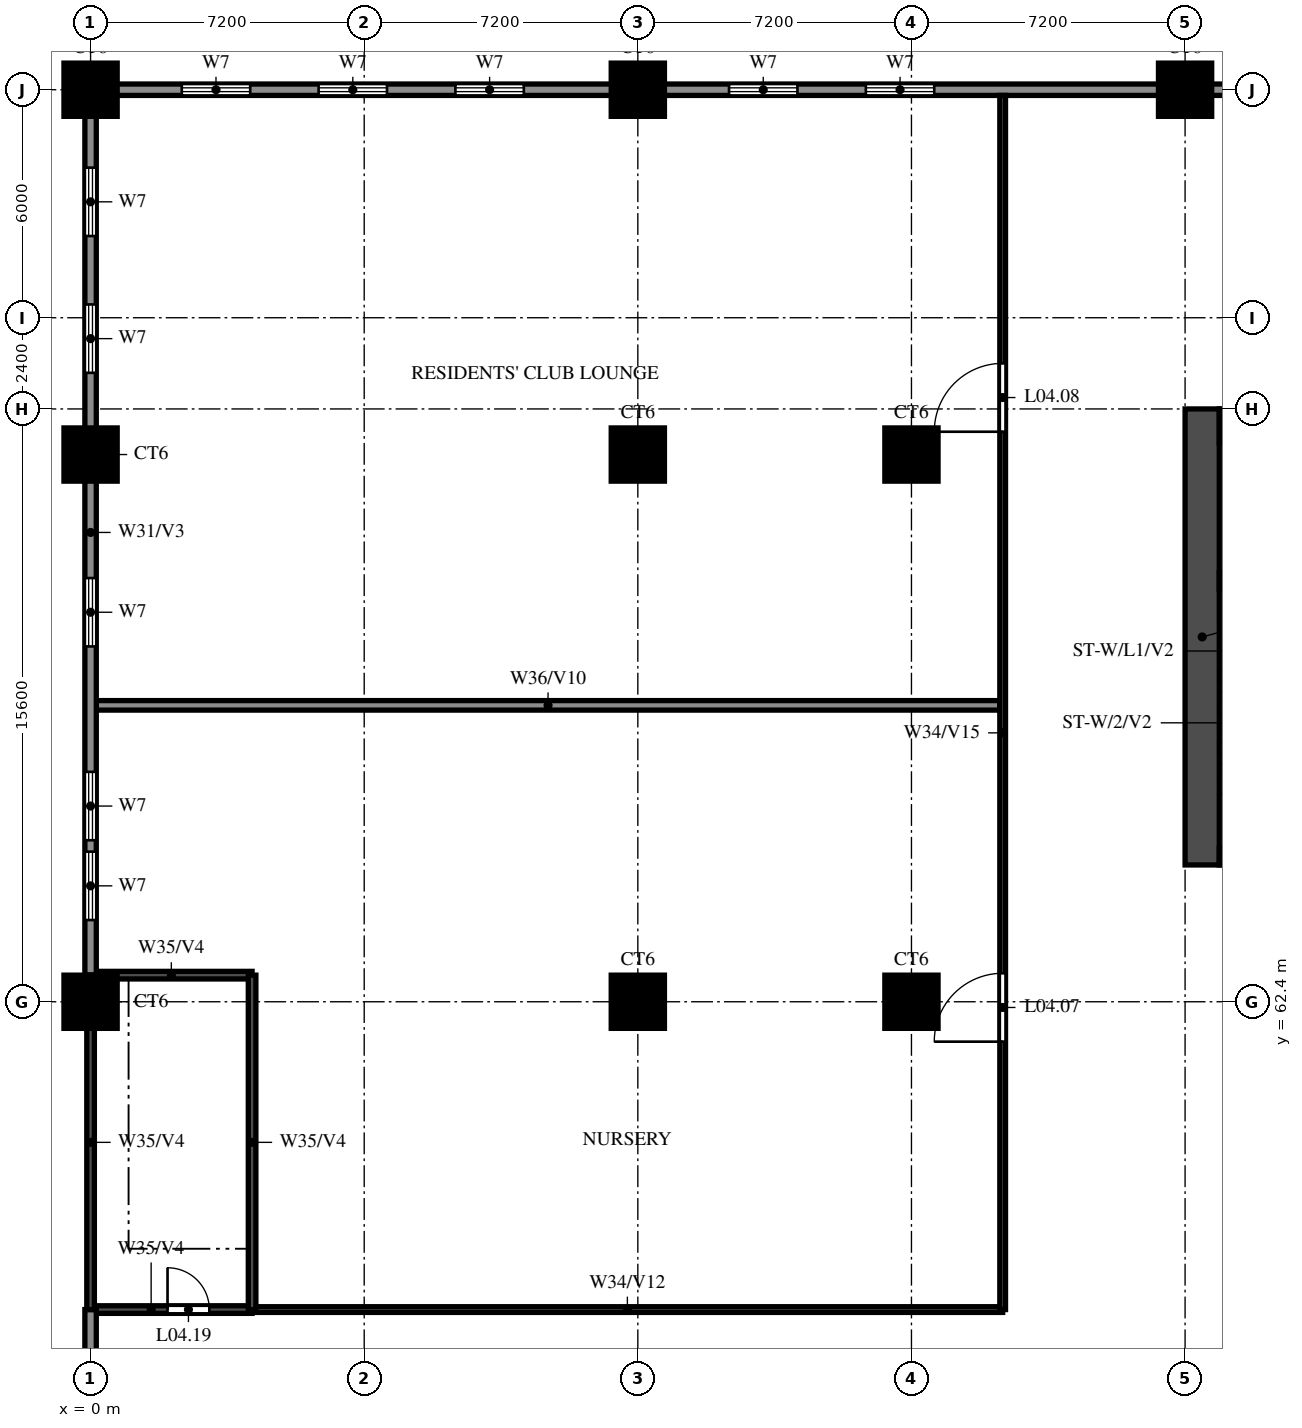
"""IFC4 building model, lengths in metres.
Left out: names, types, materials, properties, quantities, classifications, styles, units other than length and angle.
Written with IfcOpenShell. Run it as: python <this file> out.ifc"""

import sys

from ifc_helpers import new_model, si_unit, direction, frame, frame_2d, origin, origin_2d, place, context, subcontext, project, spatial, rectangle, circle, extrude, source, transform, mapped, element, fill, save


model = new_model("IFC4")
c1 = context("Model", 3, precision=1e-05, world=origin(), true_north=direction((0.0, 1.0)))
c2 = subcontext(c1, "Body", "Model", "MODEL_VIEW")
j1 = project(units=[si_unit("LENGTHUNIT", "METRE"), si_unit("PLANEANGLEUNIT", "RADIAN")], contexts=[c1])
p1 = place(None, origin())
s1 = spatial("IfcSite", under=j1, at=p1, CompositionType="ELEMENT")
p2 = place(p1, origin())
s2 = spatial("IfcBuilding", under=s1, at=p2, CompositionType="ELEMENT")
p3 = place(p2, frame((0.0, 0.0, 21.6)))
s3 = spatial("IfcBuildingStorey", under=s2, at=p3, CompositionType="ELEMENT", Elevation=21.6)
m1 = source(origin(), c2, "Body", "SweptSolid", [
    extrude(circle(Radius=0.7, at=origin_2d()), origin(), (0.0, 0.0, 1.0), 4.95),
])
for number, where, z_axis, x_axis in (
    (1, (0.0, 62.4, 0.0), (0.0, 0.0, 1.0), (1.0, 0.0, 0.0)),
    (2, (14.4, 62.4, 0.0), (0.0, 0.0, 1.0), (1.0, 0.0, 0.0)),
    (3, (21.6, 62.4, 0.0), (0.0, 0.0, 1.0), (1.0, 0.0, 0.0)),
    (4, (0.0, 76.8, 0.0), (0.0, 0.0, 1.0), (1.0, 0.0, 0.0)),
    (5, (14.4, 76.8, 0.0), (0.0, 0.0, 1.0), (1.0, 0.0, 0.0)),
    (6, (21.6, 76.8, 0.0), (0.0, 0.0, 1.0), (1.0, 0.0, 0.0)),
    (7, (0.0, 86.4, 0.0), (0.0, 0.0, 1.0), (1.0, 0.0, 0.0)),
    (8, (14.4, 86.4, 0.0), (0.0, 0.0, 1.0), (1.0, 0.0, 0.0)),
    (9, (28.8, 86.4, 0.0), (0.0, 0.0, 1.0), (1.0, 0.0, 0.0)),
):
    element("IfcColumn", number, at=place(p3, frame(where, z_axis=z_axis, x_axis=x_axis)), inside=s3, PredefinedType="COLUMN", context=c2, shape_type="MappedRepresentation", body=[
        mapped(m1, transform((0.0, 0.0, 0.0))),
    ])
p4 = place(p3, frame((29.25, 66.0, 0.0), z_axis=(0.0, 0.0, 1.0), x_axis=(0.0, 1.0, 0.0)))
e10 = element("IfcWall", 10, at=p4, inside=s3, PredefinedType="SHEAR", context=c2, shape_type="SweptSolid", body=[
    extrude(rectangle(XDim=12.0, YDim=0.9, at=frame_2d((6.0, 0.0))), origin(), (0.0, 0.0, 1.0), 4.95),
])
p5 = place(p3, frame((29.7, 77.55, 0.0), z_axis=(0.0, 0.0, 1.0), x_axis=(1.0, 0.0, 0.0)))
e11 = element("IfcWall", 11, at=p5, inside=s3, PredefinedType="SHEAR", context=c2, shape_type="SweptSolid", body=[
    extrude(rectangle(XDim=41.4, YDim=0.9, at=frame_2d((20.7, 0.0))), origin(), (0.0, 0.0, 1.0), 4.95),
])
p6 = place(p3, frame((29.7, 66.225, 0.0), z_axis=(0.0, 0.0, 1.0), x_axis=(1.0, 0.0, 0.0)))
e12 = element("IfcWall", 12, at=p6, inside=s3, PredefinedType="SHEAR", context=c2, shape_type="SweptSolid", body=[
    extrude(rectangle(XDim=41.4, YDim=0.45, at=frame_2d((20.7, 0.0))), origin(), (0.0, 0.0, 1.0), 4.95),
])
p7 = place(p6, frame((0.925, 0.0, 0.0)))
e13 = element("IfcOpeningElement", 13, at=p7, cuts=e12, PredefinedType="OPENING", context=c2, shape_type="SweptSolid", body=[
    extrude(rectangle(XDim=1.1, YDim=2.1, at=frame_2d((0.55, 1.05))), frame((0.0, 0.235, 0.0), z_axis=(0.0, -1.0, 0.0), x_axis=(1.0, 0.0, 0.0)), (0.0, 0.0, 1.0), 0.47),
])
p8 = place(p6, frame((3.738, 0.0, 0.0)))
e14 = element("IfcOpeningElement", 14, at=p8, cuts=e12, PredefinedType="OPENING", context=c2, shape_type="SweptSolid", body=[
    extrude(rectangle(XDim=1.8, YDim=2.1, at=frame_2d((0.9, 1.05))), frame((0.0, 0.235, 0.0), z_axis=(0.0, -1.0, 0.0), x_axis=(1.0, 0.0, 0.0)), (0.0, 0.0, 1.0), 0.47),
])
p9 = place(p3, frame((29.7, 73.475, 0.0), z_axis=(0.0, 0.0, 1.0), x_axis=(1.0, 0.0, 0.0)))
e15 = element("IfcWall", 15, at=p9, inside=s3, PredefinedType="SHEAR", context=c2, shape_type="SweptSolid", body=[
    extrude(rectangle(XDim=3.175, YDim=0.45, at=frame_2d((1.587, 0.0))), origin(), (0.0, 0.0, 1.0), 4.95),
])
p10 = place(p3, frame((4.25, 54.3, 0.0), z_axis=(0.0, 0.0, 1.0), x_axis=(1.0, 0.0, 0.0)))
e16 = element("IfcWall", 16, at=p10, inside=s3, PredefinedType="PARTITIONING", context=c2, shape_type="SweptSolid", body=[
    extrude(rectangle(XDim=19.75, YDim=0.15, at=frame_2d((9.875, 0.0))), origin(), (0.0, 0.0, 1.0), 3.45),
])
p11 = place(p3, frame((0.0, 54.3, 0.0), z_axis=(0.0, 0.0, 1.0), x_axis=(1.0, 0.0, 0.0)))
e17 = element("IfcWall", 17, at=p11, inside=s3, PredefinedType="SOLIDWALL", context=c2, shape_type="SweptSolid", body=[
    extrude(rectangle(XDim=4.25, YDim=0.2, at=frame_2d((2.125, 0.0))), origin(), (0.0, 0.0, 1.0), 4.95),
])
p12 = place(p11, frame((2.025, 0.0, 0.0)))
e18 = element("IfcOpeningElement", 18, at=p12, cuts=e17, PredefinedType="OPENING", context=c2, shape_type="SweptSolid", body=[
    extrude(rectangle(XDim=1.1, YDim=2.1, at=frame_2d((0.55, 1.05))), frame((0.0, 0.11, 0.0), z_axis=(0.0, -1.0, 0.0), x_axis=(1.0, 0.0, 0.0)), (0.0, 0.0, 1.0), 0.22),
])
p13 = place(p3, frame((0.0, 63.1, 0.0), z_axis=(0.0, 0.0, 1.0), x_axis=(1.0, 0.0, 0.0)))
e19 = element("IfcWall", 19, at=p13, inside=s3, PredefinedType="SOLIDWALL", context=c2, shape_type="SweptSolid", body=[
    extrude(rectangle(XDim=4.25, YDim=0.2, at=frame_2d((2.125, 0.0))), origin(), (0.0, 0.0, 1.0), 4.95),
])
p14 = place(p3, frame((0.15, 70.2, 0.0), z_axis=(0.0, 0.0, 1.0), x_axis=(1.0, 0.0, 0.0)))
e20 = element("IfcWall", 20, at=p14, inside=s3, PredefinedType="SOLIDWALL", context=c2, shape_type="SweptSolid", body=[
    extrude(rectangle(XDim=23.775, YDim=0.25, at=frame_2d((11.888, 0.0))), origin(), (0.0, 0.0, 1.0), 3.45),
])
p15 = place(p3, frame((0.0, 86.4, 0.0), z_axis=(0.0, 0.0, 1.0), x_axis=(1.0, 0.0, 0.0)))
e21 = element("IfcWall", 21, at=p15, inside=s3, PredefinedType="SOLIDWALL", context=c2, shape_type="SweptSolid", body=[
    extrude(rectangle(XDim=100.8, YDim=0.3, at=frame_2d((50.4, 0.0))), origin(), (0.0, 0.0, 1.0), 4.95),
])
p16 = place(p15, frame((2.4, 0.0, 0.6)))
e22 = element("IfcOpeningElement", 22, at=p16, cuts=e21, PredefinedType="OPENING", context=c2, shape_type="SweptSolid", body=[
    extrude(rectangle(XDim=1.8, YDim=2.4, at=frame_2d((0.9, 1.2))), frame((0.0, 0.16, 0.0), z_axis=(0.0, -1.0, 0.0), x_axis=(1.0, 0.0, 0.0)), (0.0, 0.0, 1.0), 0.32),
])
p17 = place(p15, frame((6.0, 0.0, 0.6)))
e23 = element("IfcOpeningElement", 23, at=p17, cuts=e21, PredefinedType="OPENING", context=c2, shape_type="SweptSolid", body=[
    extrude(rectangle(XDim=1.8, YDim=2.4, at=frame_2d((0.9, 1.2))), frame((0.0, 0.16, 0.0), z_axis=(0.0, -1.0, 0.0), x_axis=(1.0, 0.0, 0.0)), (0.0, 0.0, 1.0), 0.32),
])
p18 = place(p15, frame((9.6, 0.0, 0.6)))
e24 = element("IfcOpeningElement", 24, at=p18, cuts=e21, PredefinedType="OPENING", context=c2, shape_type="SweptSolid", body=[
    extrude(rectangle(XDim=1.8, YDim=2.4, at=frame_2d((0.9, 1.2))), frame((0.0, 0.16, 0.0), z_axis=(0.0, -1.0, 0.0), x_axis=(1.0, 0.0, 0.0)), (0.0, 0.0, 1.0), 0.32),
])
p19 = place(p15, frame((16.8, 0.0, 0.6)))
e25 = element("IfcOpeningElement", 25, at=p19, cuts=e21, PredefinedType="OPENING", context=c2, shape_type="SweptSolid", body=[
    extrude(rectangle(XDim=1.8, YDim=2.4, at=frame_2d((0.9, 1.2))), frame((0.0, 0.16, 0.0), z_axis=(0.0, -1.0, 0.0), x_axis=(1.0, 0.0, 0.0)), (0.0, 0.0, 1.0), 0.32),
])
p20 = place(p15, frame((20.4, 0.0, 0.6)))
e26 = element("IfcOpeningElement", 26, at=p20, cuts=e21, PredefinedType="OPENING", context=c2, shape_type="SweptSolid", body=[
    extrude(rectangle(XDim=1.8, YDim=2.4, at=frame_2d((0.9, 1.2))), frame((0.0, 0.16, 0.0), z_axis=(0.0, -1.0, 0.0), x_axis=(1.0, 0.0, 0.0)), (0.0, 0.0, 1.0), 0.32),
])
p21 = place(p15, frame((78.0, 0.0, 0.6)))
e27 = element("IfcOpeningElement", 27, at=p21, cuts=e21, PredefinedType="OPENING", context=c2, shape_type="SweptSolid", body=[
    extrude(rectangle(XDim=1.8, YDim=2.4, at=frame_2d((0.9, 1.2))), frame((0.0, 0.16, 0.0), z_axis=(0.0, -1.0, 0.0), x_axis=(1.0, 0.0, 0.0)), (0.0, 0.0, 1.0), 0.32),
])
p22 = place(p15, frame((81.6, 0.0, 0.6)))
e28 = element("IfcOpeningElement", 28, at=p22, cuts=e21, PredefinedType="OPENING", context=c2, shape_type="SweptSolid", body=[
    extrude(rectangle(XDim=1.8, YDim=2.4, at=frame_2d((0.9, 1.2))), frame((0.0, 0.16, 0.0), z_axis=(0.0, -1.0, 0.0), x_axis=(1.0, 0.0, 0.0)), (0.0, 0.0, 1.0), 0.32),
])
p23 = place(p15, frame((88.8, 0.0, 0.6)))
e29 = element("IfcOpeningElement", 29, at=p23, cuts=e21, PredefinedType="OPENING", context=c2, shape_type="SweptSolid", body=[
    extrude(rectangle(XDim=1.8, YDim=2.4, at=frame_2d((0.9, 1.2))), frame((0.0, 0.16, 0.0), z_axis=(0.0, -1.0, 0.0), x_axis=(1.0, 0.0, 0.0)), (0.0, 0.0, 1.0), 0.32),
])
p24 = place(p15, frame((92.4, 0.0, 0.6)))
e30 = element("IfcOpeningElement", 30, at=p24, cuts=e21, PredefinedType="OPENING", context=c2, shape_type="SweptSolid", body=[
    extrude(rectangle(XDim=1.8, YDim=2.4, at=frame_2d((0.9, 1.2))), frame((0.0, 0.16, 0.0), z_axis=(0.0, -1.0, 0.0), x_axis=(1.0, 0.0, 0.0)), (0.0, 0.0, 1.0), 0.32),
])
p25 = place(p15, frame((96.0, 0.0, 0.6)))
e31 = element("IfcOpeningElement", 31, at=p25, cuts=e21, PredefinedType="OPENING", context=c2, shape_type="SweptSolid", body=[
    extrude(rectangle(XDim=1.8, YDim=2.4, at=frame_2d((0.9, 1.2))), frame((0.0, 0.16, 0.0), z_axis=(0.0, -1.0, 0.0), x_axis=(1.0, 0.0, 0.0)), (0.0, 0.0, 1.0), 0.32),
])
p26 = place(p3, frame((0.0, 51.1, 0.0), z_axis=(0.0, 0.0, 1.0), x_axis=(0.0, 1.0, 0.0)))
e32 = element("IfcWall", 32, at=p26, inside=s3, PredefinedType="SOLIDWALL", context=c2, shape_type="SweptSolid", body=[
    extrude(rectangle(XDim=3.2, YDim=0.3, at=frame_2d((1.6, 0.0))), origin(), (0.0, 0.0, 1.0), 4.95),
])
p27 = place(p3, frame((0.0, 63.1, 0.0), z_axis=(0.0, 0.0, 1.0), x_axis=(0.0, 1.0, 0.0)))
e33 = element("IfcWall", 33, at=p27, inside=s3, PredefinedType="SOLIDWALL", context=c2, shape_type="SweptSolid", body=[
    extrude(rectangle(XDim=23.3, YDim=0.3, at=frame_2d((11.65, 0.0))), origin(), (0.0, 0.0, 1.0), 4.95),
])
p28 = place(p27, frame((1.45, 0.0, 0.6)))
e34 = element("IfcOpeningElement", 34, at=p28, cuts=e33, PredefinedType="OPENING", context=c2, shape_type="SweptSolid", body=[
    extrude(rectangle(XDim=1.8, YDim=2.4, at=frame_2d((0.9, 1.2))), frame((0.0, 0.16, 0.0), z_axis=(0.0, -1.0, 0.0), x_axis=(1.0, 0.0, 0.0)), (0.0, 0.0, 1.0), 0.32),
])
p29 = place(p27, frame((3.55, 0.0, 0.6)))
e35 = element("IfcOpeningElement", 35, at=p29, cuts=e33, PredefinedType="OPENING", context=c2, shape_type="SweptSolid", body=[
    extrude(rectangle(XDim=1.8, YDim=2.4, at=frame_2d((0.9, 1.2))), frame((0.0, 0.16, 0.0), z_axis=(0.0, -1.0, 0.0), x_axis=(1.0, 0.0, 0.0)), (0.0, 0.0, 1.0), 0.32),
])
p30 = place(p27, frame((8.65, 0.0, 0.6)))
e36 = element("IfcOpeningElement", 36, at=p30, cuts=e33, PredefinedType="OPENING", context=c2, shape_type="SweptSolid", body=[
    extrude(rectangle(XDim=1.8, YDim=2.4, at=frame_2d((0.9, 1.2))), frame((0.0, 0.16, 0.0), z_axis=(0.0, -1.0, 0.0), x_axis=(1.0, 0.0, 0.0)), (0.0, 0.0, 1.0), 0.32),
])
p31 = place(p27, frame((15.85, 0.0, 0.6)))
e37 = element("IfcOpeningElement", 37, at=p31, cuts=e33, PredefinedType="OPENING", context=c2, shape_type="SweptSolid", body=[
    extrude(rectangle(XDim=1.8, YDim=2.4, at=frame_2d((0.9, 1.2))), frame((0.0, 0.16, 0.0), z_axis=(0.0, -1.0, 0.0), x_axis=(1.0, 0.0, 0.0)), (0.0, 0.0, 1.0), 0.32),
])
p32 = place(p27, frame((19.45, 0.0, 0.6)))
e38 = element("IfcOpeningElement", 38, at=p32, cuts=e33, PredefinedType="OPENING", context=c2, shape_type="SweptSolid", body=[
    extrude(rectangle(XDim=1.8, YDim=2.4, at=frame_2d((0.9, 1.2))), frame((0.0, 0.16, 0.0), z_axis=(0.0, -1.0, 0.0), x_axis=(1.0, 0.0, 0.0)), (0.0, 0.0, 1.0), 0.32),
])
for number, where, z_axis, x_axis in (
    (39, (0.0, 54.3, 0.0), (0.0, 0.0, 1.0), (0.0, 1.0, 0.0)),
    (40, (4.25, 54.3, 0.0), (0.0, 0.0, 1.0), (0.0, 1.0, 0.0)),
):
    element("IfcWall", number, at=place(p3, frame(where, z_axis=z_axis, x_axis=x_axis)), inside=s3, PredefinedType="SOLIDWALL", context=c2, shape_type="SweptSolid", body=[
        extrude(rectangle(XDim=8.8, YDim=0.2, at=frame_2d((4.4, 0.0))), origin(), (0.0, 0.0, 1.0), 4.95),
    ])
p33 = place(p3, frame((24.0, 54.3, 0.0), z_axis=(0.0, 0.0, 1.0), x_axis=(0.0, 1.0, 0.0)))
e41 = element("IfcWall", 41, at=p33, inside=s3, PredefinedType="PARTITIONING", context=c2, shape_type="SweptSolid", body=[
    extrude(rectangle(XDim=31.95, YDim=0.15, at=frame_2d((15.975, 0.0))), origin(), (0.0, 0.0, 1.0), 3.75),
])
p34 = place(p33, frame((7.05, 0.0, 0.0)))
e42 = element("IfcOpeningElement", 42, at=p34, cuts=e41, PredefinedType="OPENING", context=c2, shape_type="SweptSolid", body=[
    extrude(rectangle(XDim=1.8, YDim=2.1, at=frame_2d((0.9, 1.05))), frame((0.0, 0.085, 0.0), z_axis=(0.0, -1.0, 0.0), x_axis=(1.0, 0.0, 0.0)), (0.0, 0.0, 1.0), 0.17),
])
p35 = place(p33, frame((23.1, 0.0, 0.0)))
e43 = element("IfcOpeningElement", 43, at=p35, cuts=e41, PredefinedType="OPENING", context=c2, shape_type="SweptSolid", body=[
    extrude(rectangle(XDim=1.8, YDim=2.1, at=frame_2d((0.9, 1.05))), frame((0.0, 0.085, 0.0), z_axis=(0.0, -1.0, 0.0), x_axis=(1.0, 0.0, 0.0)), (0.0, 0.0, 1.0), 0.17),
])
p36 = place(p34, origin())
e44 = element("IfcDoor", 44, at=p36, inside=s3, OperationType="DOUBLE_DOOR_SINGLE_SWING", PredefinedType="DOOR", context=c2, shape_type="SweptSolid", body=[
    extrude(rectangle(XDim=1.8, YDim=2.1, at=frame_2d((0.9, 1.05))), frame((0.0, 0.025, 0.0), z_axis=(0.0, -1.0, 0.0), x_axis=(1.0, 0.0, 0.0)), (0.0, 0.0, 1.0), 0.05),
])
fill(e42, e44)
p37 = place(p35, origin())
e45 = element("IfcDoor", 45, at=p37, inside=s3, OperationType="DOUBLE_DOOR_SINGLE_SWING", PredefinedType="DOOR", context=c2, shape_type="SweptSolid", body=[
    extrude(rectangle(XDim=1.8, YDim=2.1, at=frame_2d((0.9, 1.05))), frame((0.0, 0.025, 0.0), z_axis=(0.0, -1.0, 0.0), x_axis=(1.0, 0.0, 0.0)), (0.0, 0.0, 1.0), 0.05),
])
fill(e43, e45)
p38 = place(p12, origin())
e46 = element("IfcDoor", 46, at=p38, inside=s3, OperationType="SINGLE_SWING_RIGHT", PredefinedType="DOOR", context=c2, shape_type="SweptSolid", body=[
    extrude(rectangle(XDim=1.1, YDim=2.1, at=frame_2d((0.55, 1.05))), frame((0.0, 0.025, 0.0), z_axis=(0.0, -1.0, 0.0), x_axis=(1.0, 0.0, 0.0)), (0.0, 0.0, 1.0), 0.05),
])
fill(e18, e46)
p39 = place(p16, origin())
e47 = element("IfcWindow", 47, at=p39, inside=s3, PartitioningType="DOUBLE_PANEL_VERTICAL", PredefinedType="WINDOW", context=c2, shape_type="SweptSolid", body=[
    extrude(rectangle(XDim=1.8, YDim=2.4, at=frame_2d((0.9, 1.2))), frame((0.0, 0.03, 0.0), z_axis=(0.0, -1.0, 0.0), x_axis=(1.0, 0.0, 0.0)), (0.0, 0.0, 1.0), 0.06),
])
fill(e22, e47)
p40 = place(p17, origin())
e48 = element("IfcWindow", 48, at=p40, inside=s3, PartitioningType="DOUBLE_PANEL_VERTICAL", PredefinedType="WINDOW", context=c2, shape_type="SweptSolid", body=[
    extrude(rectangle(XDim=1.8, YDim=2.4, at=frame_2d((0.9, 1.2))), frame((0.0, 0.03, 0.0), z_axis=(0.0, -1.0, 0.0), x_axis=(1.0, 0.0, 0.0)), (0.0, 0.0, 1.0), 0.06),
])
fill(e23, e48)
p41 = place(p18, origin())
e49 = element("IfcWindow", 49, at=p41, inside=s3, PartitioningType="DOUBLE_PANEL_VERTICAL", PredefinedType="WINDOW", context=c2, shape_type="SweptSolid", body=[
    extrude(rectangle(XDim=1.8, YDim=2.4, at=frame_2d((0.9, 1.2))), frame((0.0, 0.03, 0.0), z_axis=(0.0, -1.0, 0.0), x_axis=(1.0, 0.0, 0.0)), (0.0, 0.0, 1.0), 0.06),
])
fill(e24, e49)
p42 = place(p19, origin())
e50 = element("IfcWindow", 50, at=p42, inside=s3, PartitioningType="DOUBLE_PANEL_VERTICAL", PredefinedType="WINDOW", context=c2, shape_type="SweptSolid", body=[
    extrude(rectangle(XDim=1.8, YDim=2.4, at=frame_2d((0.9, 1.2))), frame((0.0, 0.03, 0.0), z_axis=(0.0, -1.0, 0.0), x_axis=(1.0, 0.0, 0.0)), (0.0, 0.0, 1.0), 0.06),
])
fill(e25, e50)
p43 = place(p20, origin())
e51 = element("IfcWindow", 51, at=p43, inside=s3, PartitioningType="DOUBLE_PANEL_VERTICAL", PredefinedType="WINDOW", context=c2, shape_type="SweptSolid", body=[
    extrude(rectangle(XDim=1.8, YDim=2.4, at=frame_2d((0.9, 1.2))), frame((0.0, 0.03, 0.0), z_axis=(0.0, -1.0, 0.0), x_axis=(1.0, 0.0, 0.0)), (0.0, 0.0, 1.0), 0.06),
])
fill(e26, e51)
p44 = place(p28, origin())
e52 = element("IfcWindow", 52, at=p44, inside=s3, PartitioningType="DOUBLE_PANEL_VERTICAL", PredefinedType="WINDOW", context=c2, shape_type="SweptSolid", body=[
    extrude(rectangle(XDim=1.8, YDim=2.4, at=frame_2d((0.9, 1.2))), frame((0.0, 0.03, 0.0), z_axis=(0.0, -1.0, 0.0), x_axis=(1.0, 0.0, 0.0)), (0.0, 0.0, 1.0), 0.06),
])
fill(e34, e52)
p45 = place(p29, origin())
e53 = element("IfcWindow", 53, at=p45, inside=s3, PartitioningType="DOUBLE_PANEL_VERTICAL", PredefinedType="WINDOW", context=c2, shape_type="SweptSolid", body=[
    extrude(rectangle(XDim=1.8, YDim=2.4, at=frame_2d((0.9, 1.2))), frame((0.0, 0.03, 0.0), z_axis=(0.0, -1.0, 0.0), x_axis=(1.0, 0.0, 0.0)), (0.0, 0.0, 1.0), 0.06),
])
fill(e35, e53)
p46 = place(p30, origin())
e54 = element("IfcWindow", 54, at=p46, inside=s3, PartitioningType="DOUBLE_PANEL_VERTICAL", PredefinedType="WINDOW", context=c2, shape_type="SweptSolid", body=[
    extrude(rectangle(XDim=1.8, YDim=2.4, at=frame_2d((0.9, 1.2))), frame((0.0, 0.03, 0.0), z_axis=(0.0, -1.0, 0.0), x_axis=(1.0, 0.0, 0.0)), (0.0, 0.0, 1.0), 0.06),
])
fill(e36, e54)
p47 = place(p31, origin())
e55 = element("IfcWindow", 55, at=p47, inside=s3, PartitioningType="DOUBLE_PANEL_VERTICAL", PredefinedType="WINDOW", context=c2, shape_type="SweptSolid", body=[
    extrude(rectangle(XDim=1.8, YDim=2.4, at=frame_2d((0.9, 1.2))), frame((0.0, 0.03, 0.0), z_axis=(0.0, -1.0, 0.0), x_axis=(1.0, 0.0, 0.0)), (0.0, 0.0, 1.0), 0.06),
])
fill(e37, e55)
p48 = place(p32, origin())
e56 = element("IfcWindow", 56, at=p48, inside=s3, PartitioningType="DOUBLE_PANEL_VERTICAL", PredefinedType="WINDOW", context=c2, shape_type="SweptSolid", body=[
    extrude(rectangle(XDim=1.8, YDim=2.4, at=frame_2d((0.9, 1.2))), frame((0.0, 0.03, 0.0), z_axis=(0.0, -1.0, 0.0), x_axis=(1.0, 0.0, 0.0)), (0.0, 0.0, 1.0), 0.06),
])
fill(e38, e56)
save(model, sys.argv[1])
